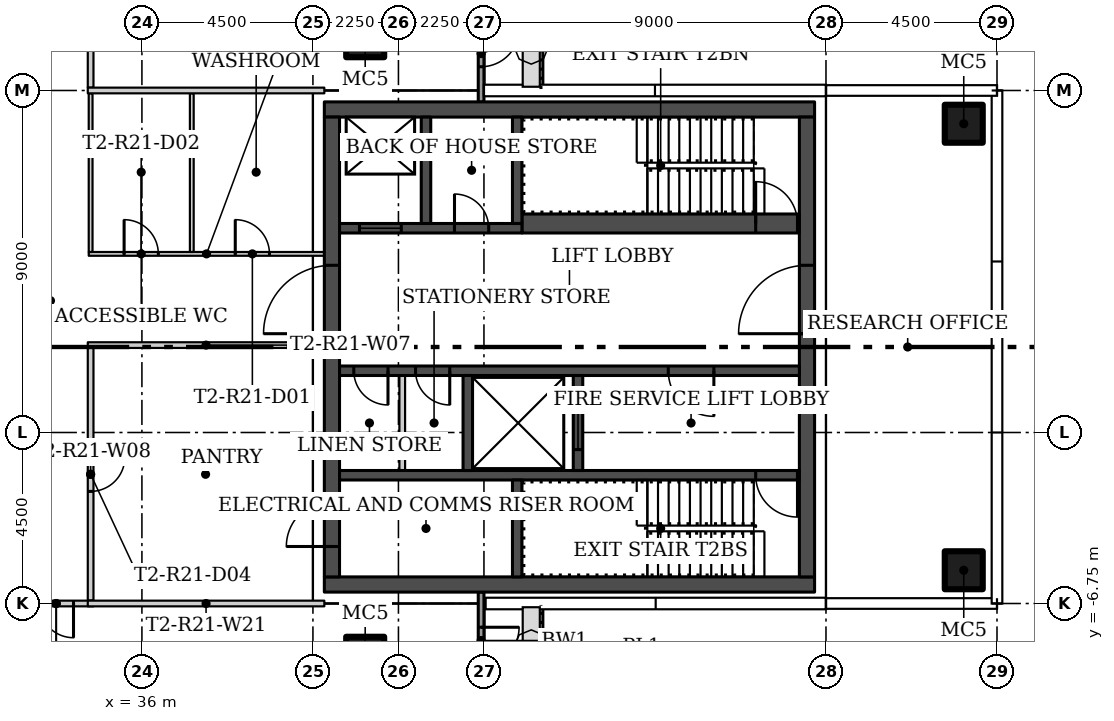
"""IFC4 building model, lengths in metres.
Left out: names, types, materials, properties, quantities, classifications, styles, units other than length and angle.
Written with IfcOpenShell. Run it as: python <this file> out.ifc"""

import sys

from ifc_helpers import new_model, si_unit, direction, frame, frame_2d, origin, origin_2d, place, context, subcontext, project, spatial, rectangle, hollow_rectangle, extrude, element, fill, save


model = new_model("IFC4")
c1 = context("Model", 3, precision=1e-05, world=origin(), true_north=direction((0.0, 1.0)))
c2 = subcontext(c1, "Body", "Model", "MODEL_VIEW")
j1 = project(units=[si_unit("LENGTHUNIT", "METRE"), si_unit("PLANEANGLEUNIT", "RADIAN")], contexts=[c1])
p1 = place(None, origin())
s1 = spatial("IfcSite", under=j1, at=p1, CompositionType="ELEMENT")
p2 = place(p1, origin())
s2 = spatial("IfcBuilding", under=s1, at=p2, CompositionType="ELEMENT")
p3 = place(p2, frame((0.0, 0.0, 194.4)))
s3 = spatial("IfcBuildingStorey", under=s2, at=p3, CompositionType="ELEMENT", Elevation=194.4)
for number, where in (
    (1, (41.875, 8.125, 0.0)),
    (2, (41.875, -8.125, 0.0)),
    (3, (57.625, -5.875, 0.0)),
    (4, (57.625, 5.875, 0.0)),
):
    element("IfcColumn", number, at=place(p3, frame(where)), inside=s3, PredefinedType="COLUMN", context=c2, shape_type="SweptSolid", body=[
        extrude(hollow_rectangle(XDim=1.0, YDim=1.0, WallThickness=0.04, at=origin_2d()), origin(), (0.0, 0.0, 1.0), 3.55),
    ])
p4 = place(p3, frame((34.6, 2.45, 0.0)))
e5 = element("IfcWall", 5, at=p4, inside=s3, PredefinedType="PARTITIONING", context=c2, shape_type="SweptSolid", body=[
    extrude(rectangle(XDim=6.2, YDim=0.1, at=frame_2d((3.1, 0.0))), origin(), (0.0, 0.0, 1.0), 3.55),
])
p5 = place(p4, frame((3.856, 0.0, 0.0)))
e6 = element("IfcOpeningElement", 6, at=p5, cuts=e5, PredefinedType="OPENING", context=c2, shape_type="SweptSolid", body=[
    extrude(rectangle(XDim=0.9, YDim=2.1, at=frame_2d((0.45, 1.05))), frame((0.0, 0.06, 0.0), z_axis=(0.0, -1.0, 0.0), x_axis=(1.0, 0.0, 0.0)), (0.0, 0.0, 1.0), 0.12),
])
p6 = place(p4, frame((0.931, 0.0, 0.0)))
e7 = element("IfcOpeningElement", 7, at=p6, cuts=e5, PredefinedType="OPENING", context=c2, shape_type="SweptSolid", body=[
    extrude(rectangle(XDim=0.9, YDim=2.1, at=frame_2d((0.45, 1.05))), frame((0.0, 0.06, 0.0), z_axis=(0.0, -1.0, 0.0), x_axis=(1.0, 0.0, 0.0)), (0.0, 0.0, 1.0), 0.12),
])
p7 = place(p3, frame((34.65, 6.675, 0.0), z_axis=(0.0, 0.0, 1.0), x_axis=(0.0, -1.0, 0.0)))
e8 = element("IfcWall", 8, at=p7, inside=s3, PredefinedType="PARTITIONING", context=c2, shape_type="SweptSolid", body=[
    extrude(rectangle(XDim=4.175, YDim=0.1, at=frame_2d((2.087, 0.0))), origin(), (0.0, 0.0, 1.0), 3.55),
])
p8 = place(p3, frame((40.8, 0.05, 0.0), z_axis=(0.0, 0.0, 1.0), x_axis=(-1.0, 0.0, 0.0)))
e9 = element("IfcWall", 9, at=p8, inside=s3, PredefinedType="PARTITIONING", context=c2, shape_type="SweptSolid", body=[
    extrude(rectangle(XDim=6.225, YDim=0.15, at=frame_2d((3.112, 0.0))), origin(), (0.0, 0.0, 1.0), 3.55),
])
p9 = place(p3, frame((34.65, -0.025, 0.0), z_axis=(0.0, 0.0, 1.0), x_axis=(0.0, -1.0, 0.0)))
e10 = element("IfcWall", 10, at=p9, inside=s3, PredefinedType="PARTITIONING", context=c2, shape_type="SweptSolid", body=[
    extrude(rectangle(XDim=6.65, YDim=0.15, at=frame_2d((3.325, 0.0))), origin(), (0.0, 0.0, 1.0), 3.55),
])
p10 = place(p9, frame((2.875, 0.0, 0.0)))
e11 = element("IfcOpeningElement", 11, at=p10, cuts=e10, PredefinedType="OPENING", context=c2, shape_type="SweptSolid", body=[
    extrude(rectangle(XDim=0.9, YDim=2.1, at=frame_2d((0.45, 1.05))), frame((0.0, 0.085, 0.0), z_axis=(0.0, -1.0, 0.0), x_axis=(1.0, 0.0, 0.0)), (0.0, 0.0, 1.0), 0.17),
])
p11 = place(p3, frame((34.65, 11.175, 0.0), z_axis=(0.0, 0.0, 1.0), x_axis=(0.0, -1.0, 0.0)))
e12 = element("IfcWall", 12, at=p11, inside=s3, PredefinedType="PARTITIONING", context=c2, shape_type="SweptSolid", body=[
    extrude(rectangle(XDim=4.35, YDim=0.15, at=frame_2d((2.175, 0.0))), origin(), (0.0, 0.0, 1.0), 3.55),
])
p12 = place(p11, frame((1.425, 0.0, 0.0)))
e13 = element("IfcOpeningElement", 13, at=p12, cuts=e12, PredefinedType="OPENING", context=c2, shape_type="SweptSolid", body=[
    extrude(rectangle(XDim=1.5, YDim=2.1, at=frame_2d((0.75, 1.05))), frame((0.0, 0.085, 0.0), z_axis=(0.0, -1.0, 0.0), x_axis=(1.0, 0.0, 0.0)), (0.0, 0.0, 1.0), 0.17),
])
p13 = place(p3, frame((34.725, -6.75, 0.0), z_axis=(0.0, 0.0, 1.0), x_axis=(-1.0, 0.0, 0.0)))
e14 = element("IfcWall", 14, at=p13, inside=s3, PredefinedType="PARTITIONING", context=c2, shape_type="SweptSolid", body=[
    extrude(rectangle(XDim=1.976, YDim=0.15, at=frame_2d((0.988, 0.0))), origin(), (0.0, 0.0, 1.0), 3.55),
])
p14 = place(p13, frame((0.525, 0.0, 0.0)))
e15 = element("IfcOpeningElement", 15, at=p14, cuts=e14, PredefinedType="OPENING", context=c2, shape_type="SweptSolid", body=[
    extrude(rectangle(XDim=0.9, YDim=2.1, at=frame_2d((0.45, 1.05))), frame((0.0, 0.085, 0.0), z_axis=(0.0, -1.0, 0.0), x_axis=(1.0, 0.0, 0.0)), (0.0, 0.0, 1.0), 0.17),
])
p15 = place(p3, frame((37.312, 6.675, 0.0), z_axis=(0.0, 0.0, 1.0), x_axis=(0.0, -1.0, 0.0)))
e16 = element("IfcWall", 16, at=p15, inside=s3, PredefinedType="PARTITIONING", context=c2, shape_type="SweptSolid", body=[
    extrude(rectangle(XDim=4.175, YDim=0.1, at=frame_2d((2.087, 0.0))), origin(), (0.0, 0.0, 1.0), 3.55),
])
p16 = place(p3, frame((40.8, 6.75, 0.0), z_axis=(0.0, 0.0, 1.0), x_axis=(-1.0, 0.0, 0.0)))
e17 = element("IfcWall", 17, at=p16, inside=s3, PredefinedType="PARTITIONING", context=c2, shape_type="SweptSolid", body=[
    extrude(rectangle(XDim=6.225, YDim=0.15, at=frame_2d((3.112, 0.0))), origin(), (0.0, 0.0, 1.0), 3.55),
])
p17 = place(p3, frame((34.575, -6.75, 0.0)))
e18 = element("IfcWall", 18, at=p17, inside=s3, PredefinedType="PARTITIONING", context=c2, shape_type="SweptSolid", body=[
    extrude(rectangle(XDim=6.225, YDim=0.15, at=frame_2d((3.112, 0.0))), origin(), (0.0, 0.0, 1.0), 3.55),
])
p18 = place(p3, frame((44.925, 9.0, 0.0), z_axis=(0.0, 0.0, 1.0), x_axis=(0.0, -1.0, 0.0)))
e19 = element("IfcWall", 19, at=p18, inside=s3, PredefinedType="SOLIDWALL", context=c2, shape_type="SweptSolid", body=[
    extrude(rectangle(XDim=2.557, YDim=0.15, at=frame_2d((1.278, 0.0))), origin(), (0.0, 0.0, 1.0), 3.45),
])
p19 = place(p18, frame((0.625, 0.0, 0.0)))
e20 = element("IfcOpeningElement", 20, at=p19, cuts=e19, PredefinedType="OPENING", context=c2, shape_type="SweptSolid", body=[
    extrude(rectangle(XDim=1.0, YDim=2.4, at=frame_2d((0.5, 1.2))), frame((0.0, 0.085, 0.0), z_axis=(0.0, -1.0, 0.0), x_axis=(1.0, 0.0, 0.0)), (0.0, 0.0, 1.0), 0.17),
])
p20 = place(p3, frame((44.925, -6.448, 0.0), z_axis=(0.0, 0.0, 1.0), x_axis=(0.0, -1.0, 0.0)))
e21 = element("IfcWall", 21, at=p20, inside=s3, PredefinedType="SOLIDWALL", context=c2, shape_type="SweptSolid", body=[
    extrude(rectangle(XDim=2.552, YDim=0.15, at=frame_2d((1.276, 0.0))), origin(), (0.0, 0.0, 1.0), 3.45),
])
p21 = place(p20, frame((0.927, 0.0, 0.0)))
e22 = element("IfcOpeningElement", 22, at=p21, cuts=e21, PredefinedType="OPENING", context=c2, shape_type="SweptSolid", body=[
    extrude(rectangle(XDim=1.0, YDim=2.4, at=frame_2d((0.5, 1.2))), frame((0.0, 0.085, 0.0), z_axis=(0.0, -1.0, 0.0), x_axis=(1.0, 0.0, 0.0)), (0.0, 0.0, 1.0), 0.17),
])
for number, where, z_axis, x_axis in (
    (23, (53.7, -6.25, 0.0), (0.0, 0.0, 1.0), (-1.0, 0.0, 0.0)),
    (24, (53.7, 6.25, 0.0), (0.0, 0.0, 1.0), (-1.0, 0.0, 0.0)),
):
    element("IfcWall", number, at=place(p3, frame(where, z_axis=z_axis, x_axis=x_axis)), inside=s3, PredefinedType="SHEAR", context=c2, shape_type="SweptSolid", body=[
        extrude(rectangle(XDim=12.9, YDim=0.4, at=frame_2d((6.45, 0.0))), origin(), (0.0, 0.0, 1.0), 3.55),
    ])
p22 = place(p3, frame((53.5, -6.05, 0.0), z_axis=(0.0, 0.0, 1.0), x_axis=(0.0, 1.0, 0.0)))
e25 = element("IfcWall", 25, at=p22, inside=s3, PredefinedType="SHEAR", context=c2, shape_type="SweptSolid", body=[
    extrude(rectangle(XDim=12.1, YDim=0.4, at=frame_2d((6.05, 0.0))), origin(), (0.0, 0.0, 1.0), 3.55),
])
p23 = place(p22, frame((6.4, 0.0, 0.0)))
e26 = element("IfcOpeningElement", 26, at=p23, cuts=e25, PredefinedType="OPENING", context=c2, shape_type="SweptSolid", body=[
    extrude(rectangle(XDim=1.8, YDim=2.4, at=frame_2d((0.9, 1.2))), frame((0.0, 0.21, 0.0), z_axis=(0.0, -1.0, 0.0), x_axis=(1.0, 0.0, 0.0)), (0.0, 0.0, 1.0), 0.42),
])
p24 = place(p3, frame((41.0, -6.05, 0.0), z_axis=(0.0, 0.0, 1.0), x_axis=(0.0, 1.0, 0.0)))
e27 = element("IfcWall", 27, at=p24, inside=s3, PredefinedType="SHEAR", context=c2, shape_type="SweptSolid", body=[
    extrude(rectangle(XDim=12.1, YDim=0.4, at=frame_2d((6.05, 0.0))), origin(), (0.0, 0.0, 1.0), 3.55),
])
p25 = place(p24, frame((0.8, 0.0, 0.0)))
e28 = element("IfcOpeningElement", 28, at=p25, cuts=e27, PredefinedType="OPENING", context=c2, shape_type="SweptSolid", body=[
    extrude(rectangle(XDim=1.2, YDim=2.1, at=frame_2d((0.6, 1.05))), frame((0.0, 0.21, 0.0), z_axis=(0.0, -1.0, 0.0), x_axis=(1.0, 0.0, 0.0)), (0.0, 0.0, 1.0), 0.42),
])
p26 = place(p24, frame((6.4, 0.0, 0.0)))
e29 = element("IfcOpeningElement", 29, at=p26, cuts=e27, PredefinedType="OPENING", context=c2, shape_type="SweptSolid", body=[
    extrude(rectangle(XDim=1.8, YDim=2.4, at=frame_2d((0.9, 1.2))), frame((0.0, 0.21, 0.0), z_axis=(0.0, -1.0, 0.0), x_axis=(1.0, 0.0, 0.0)), (0.0, 0.0, 1.0), 0.42),
])
p27 = place(p3, frame((53.3, -3.375, 0.0), z_axis=(0.0, 0.0, 1.0), x_axis=(-1.0, 0.0, 0.0)))
e30 = element("IfcWall", 30, at=p27, inside=s3, PredefinedType="SHEAR", context=c2, shape_type="SweptSolid", body=[
    extrude(rectangle(XDim=12.1, YDim=0.25, at=frame_2d((6.05, 0.0))), origin(), (0.0, 0.0, 1.0), 3.55),
])
p28 = place(p27, frame((0.05, 0.0, 0.0)))
e31 = element("IfcOpeningElement", 31, at=p28, cuts=e30, PredefinedType="OPENING", context=c2, shape_type="SweptSolid", body=[
    extrude(rectangle(XDim=1.1, YDim=2.1, at=frame_2d((0.55, 1.05))), frame((0.0, 0.135, 0.0), z_axis=(0.0, -1.0, 0.0), x_axis=(1.0, 0.0, 0.0)), (0.0, 0.0, 1.0), 0.27),
])
p29 = place(p3, frame((45.875, -6.05, 0.0), z_axis=(0.0, 0.0, 1.0), x_axis=(0.0, 1.0, 0.0)))
e32 = element("IfcWall", 32, at=p29, inside=s3, PredefinedType="SHEAR", context=c2, shape_type="SweptSolid", body=[
    extrude(rectangle(XDim=2.55, YDim=0.25, at=frame_2d((1.275, 0.0))), origin(), (0.0, 0.0, 1.0), 3.55),
])
p30 = place(p3, frame((53.3, -0.625, 0.0), z_axis=(0.0, 0.0, 1.0), x_axis=(-1.0, 0.0, 0.0)))
e33 = element("IfcWall", 33, at=p30, inside=s3, PredefinedType="SHEAR", context=c2, shape_type="SweptSolid", body=[
    extrude(rectangle(XDim=12.1, YDim=0.25, at=frame_2d((6.05, 0.0))), origin(), (0.0, 0.0, 1.0), 3.55),
])
p31 = place(p30, frame((2.25, 0.0, 0.0)))
e34 = element("IfcOpeningElement", 34, at=p31, cuts=e33, PredefinedType="OPENING", context=c2, shape_type="SweptSolid", body=[
    extrude(rectangle(XDim=1.2, YDim=2.1, at=frame_2d((0.6, 1.05))), frame((0.0, 0.135, 0.0), z_axis=(0.0, -1.0, 0.0), x_axis=(1.0, 0.0, 0.0)), (0.0, 0.0, 1.0), 0.27),
])
p32 = place(p30, frame((9.2, 0.0, 0.0)))
e35 = element("IfcOpeningElement", 35, at=p32, cuts=e33, PredefinedType="OPENING", context=c2, shape_type="SweptSolid", body=[
    extrude(rectangle(XDim=0.9, YDim=2.1, at=frame_2d((0.45, 1.05))), frame((0.0, 0.135, 0.0), z_axis=(0.0, -1.0, 0.0), x_axis=(1.0, 0.0, 0.0)), (0.0, 0.0, 1.0), 0.27),
])
p33 = place(p30, frame((10.825, 0.0, 0.0)))
e36 = element("IfcOpeningElement", 36, at=p33, cuts=e33, PredefinedType="OPENING", context=c2, shape_type="SweptSolid", body=[
    extrude(rectangle(XDim=0.9, YDim=2.1, at=frame_2d((0.45, 1.05))), frame((0.0, 0.135, 0.0), z_axis=(0.0, -1.0, 0.0), x_axis=(1.0, 0.0, 0.0)), (0.0, 0.0, 1.0), 0.27),
])
p34 = place(p3, frame((47.475, -3.25, 0.0), z_axis=(0.0, 0.0, 1.0), x_axis=(0.0, 1.0, 0.0)))
e37 = element("IfcWall", 37, at=p34, inside=s3, PredefinedType="SHEAR", context=c2, shape_type="SweptSolid", body=[
    extrude(rectangle(XDim=2.5, YDim=0.25, at=frame_2d((1.25, 0.0))), origin(), (0.0, 0.0, 1.0), 3.55),
])
p35 = place(p34, frame((0.55, 0.0, 0.0)))
e38 = element("IfcOpeningElement", 38, at=p35, cuts=e37, PredefinedType="OPENING", context=c2, shape_type="SweptSolid", body=[
    extrude(rectangle(XDim=1.4, YDim=2.4, at=frame_2d((0.7, 1.2))), frame((0.0, 0.135, 0.0), z_axis=(0.0, -1.0, 0.0), x_axis=(1.0, 0.0, 0.0)), (0.0, 0.0, 1.0), 0.27),
])
p36 = place(p3, frame((44.575, -3.25, 0.0), z_axis=(0.0, 0.0, 1.0), x_axis=(0.0, 1.0, 0.0)))
e39 = element("IfcWall", 39, at=p36, inside=s3, PredefinedType="SHEAR", context=c2, shape_type="SweptSolid", body=[
    extrude(rectangle(XDim=2.5, YDim=0.25, at=frame_2d((1.25, 0.0))), origin(), (0.0, 0.0, 1.0), 3.55),
])
p37 = place(p3, frame((42.85, -3.25, 0.0), z_axis=(0.0, 0.0, 1.0), x_axis=(0.0, 1.0, 0.0)))
e40 = element("IfcWall", 40, at=p37, inside=s3, PredefinedType="PARTITIONING", context=c2, shape_type="SweptSolid", body=[
    extrude(rectangle(XDim=2.5, YDim=0.15, at=frame_2d((1.25, 0.0))), origin(), (0.0, 0.0, 1.0), 3.55),
])
p38 = place(p3, frame((46.0, 3.25, 0.0)))
e41 = element("IfcWall", 41, at=p38, inside=s3, PredefinedType="SHEAR", context=c2, shape_type="SweptSolid", body=[
    extrude(rectangle(XDim=7.3, YDim=0.5, at=frame_2d((3.65, 0.0))), origin(), (0.0, 0.0, 1.0), 3.55),
])
p39 = place(p38, frame((6.15, 0.0, 0.0)))
e42 = element("IfcOpeningElement", 42, at=p39, cuts=e41, PredefinedType="OPENING", context=c2, shape_type="SweptSolid", body=[
    extrude(rectangle(XDim=1.1, YDim=2.1, at=frame_2d((0.55, 1.05))), frame((0.0, 0.26, 0.0), z_axis=(0.0, -1.0, 0.0), x_axis=(1.0, 0.0, 0.0)), (0.0, 0.0, 1.0), 0.52),
])
p40 = place(p3, frame((41.2, 3.125, 0.0)))
e43 = element("IfcWall", 43, at=p40, inside=s3, PredefinedType="SHEAR", context=c2, shape_type="SweptSolid", body=[
    extrude(rectangle(XDim=4.8, YDim=0.25, at=frame_2d((2.4, 0.0))), origin(), (0.0, 0.0, 1.0), 3.55),
])
p41 = place(p40, frame((0.525, 0.0, 0.0)))
e44 = element("IfcOpeningElement", 44, at=p41, cuts=e43, PredefinedType="OPENING", context=c2, shape_type="SweptSolid", body=[
    extrude(rectangle(XDim=1.1, YDim=2.1, at=frame_2d((0.55, 1.05))), frame((0.0, 0.135, 0.0), z_axis=(0.0, -1.0, 0.0), x_axis=(1.0, 0.0, 0.0)), (0.0, 0.0, 1.0), 0.27),
])
p42 = place(p40, frame((3.025, 0.0, 0.0)))
e45 = element("IfcOpeningElement", 45, at=p42, cuts=e43, PredefinedType="OPENING", context=c2, shape_type="SweptSolid", body=[
    extrude(rectangle(XDim=0.9, YDim=2.1, at=frame_2d((0.45, 1.05))), frame((0.0, 0.135, 0.0), z_axis=(0.0, -1.0, 0.0), x_axis=(1.0, 0.0, 0.0)), (0.0, 0.0, 1.0), 0.27),
])
for number, where, z_axis, x_axis in (
    (46, (45.875, 3.25, 0.0), (0.0, 0.0, 1.0), (0.0, 1.0, 0.0)),
    (47, (43.475, 3.25, 0.0), (0.0, 0.0, 1.0), (0.0, 1.0, 0.0)),
):
    element("IfcWall", number, at=place(p3, frame(where, z_axis=z_axis, x_axis=x_axis)), inside=s3, PredefinedType="SHEAR", context=c2, shape_type="SweptSolid", body=[
        extrude(rectangle(XDim=2.8, YDim=0.25, at=frame_2d((1.4, 0.0))), origin(), (0.0, 0.0, 1.0), 3.55),
    ])
p43 = place(p5, origin())
e48 = element("IfcDoor", 48, at=p43, inside=s3, OperationType="SINGLE_SWING_LEFT", PredefinedType="DOOR", context=c2, shape_type="SweptSolid", body=[
    extrude(rectangle(XDim=0.9, YDim=2.1, at=frame_2d((0.45, 1.05))), frame((0.0, 0.025, 0.0), z_axis=(0.0, -1.0, 0.0), x_axis=(1.0, 0.0, 0.0)), (0.0, 0.0, 1.0), 0.05),
])
fill(e6, e48)
p44 = place(p6, origin())
e49 = element("IfcDoor", 49, at=p44, inside=s3, OperationType="SINGLE_SWING_RIGHT", PredefinedType="DOOR", context=c2, shape_type="SweptSolid", body=[
    extrude(rectangle(XDim=0.9, YDim=2.1, at=frame_2d((0.45, 1.05))), frame((0.0, 0.025, 0.0), z_axis=(0.0, -1.0, 0.0), x_axis=(1.0, 0.0, 0.0)), (0.0, 0.0, 1.0), 0.05),
])
fill(e7, e49)
p45 = place(p10, origin())
e50 = element("IfcDoor", 50, at=p45, inside=s3, OperationType="SINGLE_SWING_RIGHT", PredefinedType="DOOR", context=c2, shape_type="SweptSolid", body=[
    extrude(rectangle(XDim=0.9, YDim=2.1, at=frame_2d((0.45, 1.05))), frame((0.0, 0.025, 0.0), z_axis=(0.0, -1.0, 0.0), x_axis=(1.0, 0.0, 0.0)), (0.0, 0.0, 1.0), 0.05),
])
fill(e11, e50)
p46 = place(p14, origin())
e51 = element("IfcDoor", 51, at=p46, inside=s3, OperationType="SINGLE_SWING_LEFT", PredefinedType="DOOR", context=c2, shape_type="SweptSolid", body=[
    extrude(rectangle(XDim=0.9, YDim=2.1, at=frame_2d((0.45, 1.05))), frame((0.0, 0.025, 0.0), z_axis=(0.0, -1.0, 0.0), x_axis=(1.0, 0.0, 0.0)), (0.0, 0.0, 1.0), 0.05),
])
fill(e15, e51)
p47 = place(p19, origin())
e52 = element("IfcDoor", 52, at=p47, inside=s3, OperationType="SINGLE_SWING_LEFT", PredefinedType="DOOR", context=c2, shape_type="SweptSolid", body=[
    extrude(rectangle(XDim=1.0, YDim=2.4, at=frame_2d((0.5, 1.2))), frame((0.0, 0.025, 0.0), z_axis=(0.0, -1.0, 0.0), x_axis=(1.0, 0.0, 0.0)), (0.0, 0.0, 1.0), 0.05),
])
fill(e20, e52)
p48 = place(p21, origin())
e53 = element("IfcDoor", 53, at=p48, inside=s3, OperationType="SINGLE_SWING_RIGHT", PredefinedType="DOOR", context=c2, shape_type="SweptSolid", body=[
    extrude(rectangle(XDim=1.0, YDim=2.4, at=frame_2d((0.5, 1.2))), frame((0.0, 0.025, 0.0), z_axis=(0.0, -1.0, 0.0), x_axis=(1.0, 0.0, 0.0)), (0.0, 0.0, 1.0), 0.05),
])
fill(e22, e53)
p49 = place(p23, origin())
e54 = element("IfcDoor", 54, at=p49, inside=s3, OperationType="DOUBLE_DOOR_SINGLE_SWING", PredefinedType="DOOR", context=c2, shape_type="SweptSolid", body=[
    extrude(rectangle(XDim=1.8, YDim=2.4, at=frame_2d((0.9, 1.2))), frame((0.0, 0.025, 0.0), z_axis=(0.0, -1.0, 0.0), x_axis=(1.0, 0.0, 0.0)), (0.0, 0.0, 1.0), 0.05),
])
fill(e26, e54)
p50 = place(p25, origin())
e55 = element("IfcDoor", 55, at=p50, inside=s3, OperationType="SINGLE_SWING_LEFT", PredefinedType="DOOR", context=c2, shape_type="SweptSolid", body=[
    extrude(rectangle(XDim=1.2, YDim=2.1, at=frame_2d((0.6, 1.05))), frame((0.0, 0.025, 0.0), z_axis=(0.0, -1.0, 0.0), x_axis=(1.0, 0.0, 0.0)), (0.0, 0.0, 1.0), 0.05),
])
fill(e28, e55)
p51 = place(p26, origin())
e56 = element("IfcDoor", 56, at=p51, inside=s3, OperationType="DOUBLE_DOOR_SINGLE_SWING", PredefinedType="DOOR", context=c2, shape_type="SweptSolid", body=[
    extrude(rectangle(XDim=1.8, YDim=2.4, at=frame_2d((0.9, 1.2))), frame((0.0, 0.025, 0.0), z_axis=(0.0, -1.0, 0.0), x_axis=(1.0, 0.0, 0.0)), (0.0, 0.0, 1.0), 0.05),
])
fill(e29, e56)
p52 = place(p28, origin())
e57 = element("IfcDoor", 57, at=p52, inside=s3, OperationType="SINGLE_SWING_LEFT", PredefinedType="DOOR", context=c2, shape_type="SweptSolid", body=[
    extrude(rectangle(XDim=1.1, YDim=2.1, at=frame_2d((0.55, 1.05))), frame((0.0, 0.025, 0.0), z_axis=(0.0, -1.0, 0.0), x_axis=(1.0, 0.0, 0.0)), (0.0, 0.0, 1.0), 0.05),
])
fill(e31, e57)
p53 = place(p31, origin())
e58 = element("IfcDoor", 58, at=p53, inside=s3, OperationType="SINGLE_SWING_LEFT", PredefinedType="DOOR", context=c2, shape_type="SweptSolid", body=[
    extrude(rectangle(XDim=1.2, YDim=2.1, at=frame_2d((0.6, 1.05))), frame((0.0, 0.025, 0.0), z_axis=(0.0, -1.0, 0.0), x_axis=(1.0, 0.0, 0.0)), (0.0, 0.0, 1.0), 0.05),
])
fill(e34, e58)
p54 = place(p32, origin())
e59 = element("IfcDoor", 59, at=p54, inside=s3, OperationType="SINGLE_SWING_RIGHT", PredefinedType="DOOR", context=c2, shape_type="SweptSolid", body=[
    extrude(rectangle(XDim=0.9, YDim=2.1, at=frame_2d((0.45, 1.05))), frame((0.0, 0.025, 0.0), z_axis=(0.0, -1.0, 0.0), x_axis=(1.0, 0.0, 0.0)), (0.0, 0.0, 1.0), 0.05),
])
fill(e35, e59)
p55 = place(p33, origin())
e60 = element("IfcDoor", 60, at=p55, inside=s3, OperationType="SINGLE_SWING_RIGHT", PredefinedType="DOOR", context=c2, shape_type="SweptSolid", body=[
    extrude(rectangle(XDim=0.9, YDim=2.1, at=frame_2d((0.45, 1.05))), frame((0.0, 0.025, 0.0), z_axis=(0.0, -1.0, 0.0), x_axis=(1.0, 0.0, 0.0)), (0.0, 0.0, 1.0), 0.05),
])
fill(e36, e60)
p56 = place(p35, origin())
e61 = element("IfcDoor", 61, at=p56, inside=s3, OperationType="SLIDING_TO_LEFT", PredefinedType="DOOR", context=c2, shape_type="SweptSolid", body=[
    extrude(rectangle(XDim=1.4, YDim=2.4, at=frame_2d((0.7, 1.2))), frame((0.0, 0.025, 0.0), z_axis=(0.0, -1.0, 0.0), x_axis=(1.0, 0.0, 0.0)), (0.0, 0.0, 1.0), 0.05),
])
fill(e38, e61)
p57 = place(p39, origin())
e62 = element("IfcDoor", 62, at=p57, inside=s3, OperationType="SINGLE_SWING_RIGHT", PredefinedType="DOOR", context=c2, shape_type="SweptSolid", body=[
    extrude(rectangle(XDim=1.1, YDim=2.1, at=frame_2d((0.55, 1.05))), frame((0.0, 0.025, 0.0), z_axis=(0.0, -1.0, 0.0), x_axis=(1.0, 0.0, 0.0)), (0.0, 0.0, 1.0), 0.05),
])
fill(e42, e62)
p58 = place(p41, origin())
e63 = element("IfcDoor", 63, at=p58, inside=s3, OperationType="SLIDING_TO_LEFT", PredefinedType="DOOR", context=c2, shape_type="SweptSolid", body=[
    extrude(rectangle(XDim=1.1, YDim=2.1, at=frame_2d((0.55, 1.05))), frame((0.0, 0.025, 0.0), z_axis=(0.0, -1.0, 0.0), x_axis=(1.0, 0.0, 0.0)), (0.0, 0.0, 1.0), 0.05),
])
fill(e44, e63)
p59 = place(p42, origin())
e64 = element("IfcDoor", 64, at=p59, inside=s3, OperationType="SINGLE_SWING_RIGHT", PredefinedType="DOOR", context=c2, shape_type="SweptSolid", body=[
    extrude(rectangle(XDim=0.9, YDim=2.1, at=frame_2d((0.45, 1.05))), frame((0.0, 0.025, 0.0), z_axis=(0.0, -1.0, 0.0), x_axis=(1.0, 0.0, 0.0)), (0.0, 0.0, 1.0), 0.05),
])
fill(e45, e64)
save(model, sys.argv[1])
